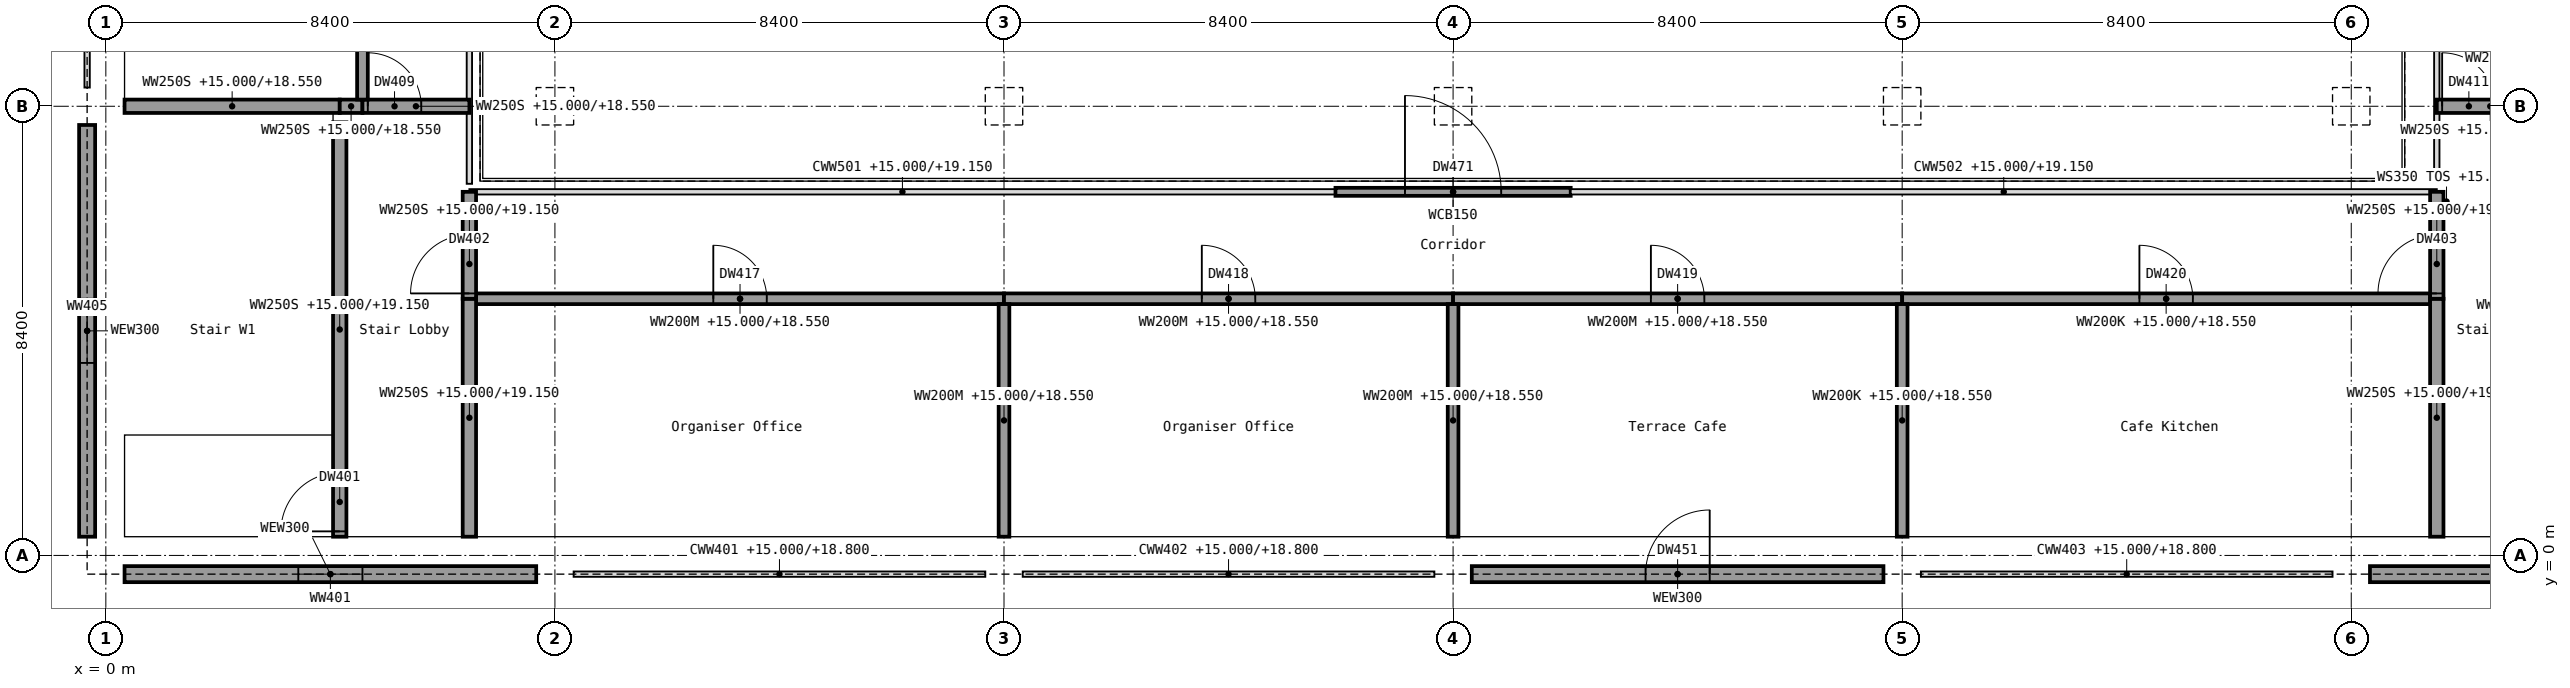
"""IFC4 building model, lengths in metres.
Left out: names, types, materials, properties, quantities, classifications, styles, units other than length and angle.
Written with IfcOpenShell. Run it as: python <this file> out.ifc"""

import sys

from ifc_helpers import new_model, si_unit, direction, frame, frame_2d, origin, origin_2d, place, context, subcontext, project, spatial, rectangle, extrude, element, fill, save


model = new_model("IFC4")
c1 = context("Model", 3, precision=1e-05, world=origin(), true_north=direction((0.0, 1.0)))
c2 = subcontext(c1, "Body", "Model", "MODEL_VIEW")
j1 = project(units=[si_unit("LENGTHUNIT", "METRE"), si_unit("PLANEANGLEUNIT", "RADIAN")], contexts=[c1])
p1 = place(None, origin())
s1 = spatial("IfcSite", under=j1, at=p1, CompositionType="ELEMENT")
p2 = place(p1, origin())
s2 = spatial("IfcBuilding", under=s1, at=p2, CompositionType="ELEMENT")
p3 = place(p2, frame((0.0, 0.0, 15.0)))
s3 = spatial("IfcBuildingStorey", under=s2, at=p3, CompositionType="ELEMENT", Elevation=15.0)
for number, where, z_axis, x_axis in (
    (1, (0.0, 0.0, 0.0), (0.0, 0.0, 1.0), (1.0, 0.0, 0.0)),
    (2, (0.0, 8.4, 0.0), (0.0, 0.0, 1.0), (1.0, 0.0, 0.0)),
    (3, (8.4, 0.0, 0.0), (0.0, 0.0, 1.0), (1.0, 0.0, 0.0)),
    (4, (8.4, 8.4, 0.0), (0.0, 0.0, 1.0), (1.0, 0.0, 0.0)),
    (5, (16.8, 0.0, 0.0), (0.0, 0.0, 1.0), (1.0, 0.0, 0.0)),
    (6, (16.8, 8.4, 0.0), (0.0, 0.0, 1.0), (1.0, 0.0, 0.0)),
    (7, (25.2, 0.0, 0.0), (0.0, 0.0, 1.0), (1.0, 0.0, 0.0)),
    (8, (25.2, 8.4, 0.0), (0.0, 0.0, 1.0), (1.0, 0.0, 0.0)),
    (9, (33.6, 0.0, 0.0), (0.0, 0.0, 1.0), (1.0, 0.0, 0.0)),
    (10, (33.6, 8.4, 0.0), (0.0, 0.0, 1.0), (1.0, 0.0, 0.0)),
    (11, (42.0, 0.0, 0.0), (0.0, 0.0, 1.0), (1.0, 0.0, 0.0)),
    (12, (42.0, 8.4, 0.0), (0.0, 0.0, 1.0), (1.0, 0.0, 0.0)),
):
    element("IfcColumn", number, at=place(p3, frame(where, z_axis=z_axis, x_axis=x_axis)), inside=s3, PredefinedType="COLUMN", context=c2, shape_type="SweptSolid", body=[
        extrude(rectangle(XDim=0.7, YDim=0.7, at=origin_2d()), origin(), (0.0, 0.0, 1.0), 4.5),
    ])
p4 = place(p3, frame((0.35, -0.35, 0.0), z_axis=(0.0, 0.0, 1.0), x_axis=(1.0, 0.0, 0.0)))
e13 = element("IfcWall", 13, at=p4, inside=s3, PredefinedType="SOLIDWALL", context=c2, shape_type="SweptSolid", body=[
    extrude(rectangle(XDim=7.7, YDim=0.3, at=frame_2d((3.85, 0.0))), origin(), (0.0, 0.0, 1.0), 3.8),
])
p5 = place(p4, frame((3.25, 0.0, 1.0)))
e14 = element("IfcOpeningElement", 14, at=p5, cuts=e13, PredefinedType="OPENING", context=c2, shape_type="SweptSolid", body=[
    extrude(rectangle(XDim=1.2, YDim=1.5, at=frame_2d((0.6, 0.75))), frame((0.0, 0.15, 0.0), z_axis=(0.0, -1.0, 0.0), x_axis=(1.0, 0.0, 0.0)), (0.0, 0.0, 1.0), 0.3),
])
p6 = place(p3, frame((25.55, -0.35, 0.0), z_axis=(0.0, 0.0, 1.0), x_axis=(1.0, 0.0, 0.0)))
e15 = element("IfcWall", 15, at=p6, inside=s3, PredefinedType="SOLIDWALL", context=c2, shape_type="SweptSolid", body=[
    extrude(rectangle(XDim=7.7, YDim=0.3, at=frame_2d((3.85, 0.0))), origin(), (0.0, 0.0, 1.0), 3.8),
])
p7 = place(p6, frame((3.25, 0.0, 0.0)))
e16 = element("IfcOpeningElement", 16, at=p7, cuts=e15, PredefinedType="OPENING", context=c2, shape_type="SweptSolid", body=[
    extrude(rectangle(XDim=1.2, YDim=2.1, at=frame_2d((0.6, 1.05))), frame((0.0, 0.15, 0.0), z_axis=(0.0, -1.0, 0.0), x_axis=(1.0, 0.0, 0.0)), (0.0, 0.0, 1.0), 0.3),
])
p8 = place(p3, frame((42.35, -0.35, 0.0), z_axis=(0.0, 0.0, 1.0), x_axis=(1.0, 0.0, 0.0)))
e17 = element("IfcWall", 17, at=p8, inside=s3, PredefinedType="SOLIDWALL", context=c2, shape_type="SweptSolid", body=[
    extrude(rectangle(XDim=7.7, YDim=0.3, at=frame_2d((3.85, 0.0))), origin(), (0.0, 0.0, 1.0), 3.8),
])
p9 = place(p8, frame((3.25, 0.0, 1.0)))
e18 = element("IfcOpeningElement", 18, at=p9, cuts=e17, PredefinedType="OPENING", context=c2, shape_type="SweptSolid", body=[
    extrude(rectangle(XDim=1.2, YDim=1.5, at=frame_2d((0.6, 0.75))), frame((0.0, 0.15, 0.0), z_axis=(0.0, -1.0, 0.0), x_axis=(1.0, 0.0, 0.0)), (0.0, 0.0, 1.0), 0.3),
])
p10 = place(p3, frame((-0.35, 0.35, 0.0), z_axis=(0.0, 0.0, 1.0), x_axis=(0.0, 1.0, 0.0)))
e19 = element("IfcWall", 19, at=p10, inside=s3, PredefinedType="SOLIDWALL", context=c2, shape_type="SweptSolid", body=[
    extrude(rectangle(XDim=7.7, YDim=0.3, at=frame_2d((3.85, 0.0))), origin(), (0.0, 0.0, 1.0), 3.8),
])
p11 = place(p10, frame((3.25, 0.0, 1.0)))
e20 = element("IfcOpeningElement", 20, at=p11, cuts=e19, PredefinedType="OPENING", context=c2, shape_type="SweptSolid", body=[
    extrude(rectangle(XDim=1.2, YDim=1.5, at=frame_2d((0.6, 0.75))), frame((0.0, 0.15, 0.0), z_axis=(0.0, -1.0, 0.0), x_axis=(1.0, 0.0, 0.0)), (0.0, 0.0, 1.0), 0.3),
])
p12 = place(p3, frame((23.0, 6.8, 0.0), z_axis=(0.0, 0.0, 1.0), x_axis=(1.0, 0.0, 0.0)))
e21 = element("IfcWall", 21, at=p12, inside=s3, PredefinedType="SOLIDWALL", context=c2, shape_type="SweptSolid", body=[
    extrude(rectangle(XDim=4.4, YDim=0.15, at=frame_2d((2.2, 0.0))), origin(), (0.0, 0.0, 1.0), 4.15),
])
p13 = place(p12, frame((1.3, 0.0, 0.0)))
e22 = element("IfcOpeningElement", 22, at=p13, cuts=e21, PredefinedType="OPENING", context=c2, shape_type="SweptSolid", body=[
    extrude(rectangle(XDim=1.8, YDim=2.4, at=frame_2d((0.9, 1.2))), frame((0.0, 0.075, 0.0), z_axis=(0.0, -1.0, 0.0), x_axis=(1.0, 0.0, 0.0)), (0.0, 0.0, 1.0), 0.15),
])
p14 = place(p3, frame((6.925, 4.8, 0.0), z_axis=(0.0, 0.0, 1.0), x_axis=(1.0, 0.0, 0.0)))
e23 = element("IfcWall", 23, at=p14, inside=s3, PredefinedType="PARTITIONING", context=c2, shape_type="SweptSolid", body=[
    extrude(rectangle(XDim=9.875, YDim=0.2, at=frame_2d((4.938, 0.0))), origin(), (0.0, 0.0, 1.0), 3.55),
])
p15 = place(p14, frame((4.438, 0.0, 0.0)))
e24 = element("IfcOpeningElement", 24, at=p15, cuts=e23, PredefinedType="OPENING", context=c2, shape_type="SweptSolid", body=[
    extrude(rectangle(XDim=1.0, YDim=2.1, at=frame_2d((0.5, 1.05))), frame((0.0, 0.1, 0.0), z_axis=(0.0, -1.0, 0.0), x_axis=(1.0, 0.0, 0.0)), (0.0, 0.0, 1.0), 0.2),
])
p16 = place(p3, frame((16.8, 4.8, 0.0), z_axis=(0.0, 0.0, 1.0), x_axis=(1.0, 0.0, 0.0)))
e25 = element("IfcWall", 25, at=p16, inside=s3, PredefinedType="PARTITIONING", context=c2, shape_type="SweptSolid", body=[
    extrude(rectangle(XDim=8.4, YDim=0.2, at=frame_2d((4.2, 0.0))), origin(), (0.0, 0.0, 1.0), 3.55),
])
p17 = place(p16, frame((3.7, 0.0, 0.0)))
e26 = element("IfcOpeningElement", 26, at=p17, cuts=e25, PredefinedType="OPENING", context=c2, shape_type="SweptSolid", body=[
    extrude(rectangle(XDim=1.0, YDim=2.1, at=frame_2d((0.5, 1.05))), frame((0.0, 0.1, 0.0), z_axis=(0.0, -1.0, 0.0), x_axis=(1.0, 0.0, 0.0)), (0.0, 0.0, 1.0), 0.2),
])
p18 = place(p3, frame((25.2, 4.8, 0.0), z_axis=(0.0, 0.0, 1.0), x_axis=(1.0, 0.0, 0.0)))
e27 = element("IfcWall", 27, at=p18, inside=s3, PredefinedType="PARTITIONING", context=c2, shape_type="SweptSolid", body=[
    extrude(rectangle(XDim=8.4, YDim=0.2, at=frame_2d((4.2, 0.0))), origin(), (0.0, 0.0, 1.0), 3.55),
])
p19 = place(p18, frame((3.7, 0.0, 0.0)))
e28 = element("IfcOpeningElement", 28, at=p19, cuts=e27, PredefinedType="OPENING", context=c2, shape_type="SweptSolid", body=[
    extrude(rectangle(XDim=1.0, YDim=2.1, at=frame_2d((0.5, 1.05))), frame((0.0, 0.1, 0.0), z_axis=(0.0, -1.0, 0.0), x_axis=(1.0, 0.0, 0.0)), (0.0, 0.0, 1.0), 0.2),
])
p20 = place(p3, frame((33.6, 4.8, 0.0), z_axis=(0.0, 0.0, 1.0), x_axis=(1.0, 0.0, 0.0)))
e29 = element("IfcWall", 29, at=p20, inside=s3, PredefinedType="SOLIDWALL", context=c2, shape_type="SweptSolid", body=[
    extrude(rectangle(XDim=9.875, YDim=0.2, at=frame_2d((4.938, 0.0))), origin(), (0.0, 0.0, 1.0), 3.55),
])
p21 = place(p20, frame((4.438, 0.0, 0.0)))
e30 = element("IfcOpeningElement", 30, at=p21, cuts=e29, PredefinedType="OPENING", context=c2, shape_type="SweptSolid", body=[
    extrude(rectangle(XDim=1.0, YDim=2.1, at=frame_2d((0.5, 1.05))), frame((0.0, 0.1, 0.0), z_axis=(0.0, -1.0, 0.0), x_axis=(1.0, 0.0, 0.0)), (0.0, 0.0, 1.0), 0.2),
])
p22 = place(p3, frame((0.35, 8.4, 0.0), z_axis=(0.0, 0.0, 1.0), x_axis=(1.0, 0.0, 0.0)))
e31 = element("IfcWall", 31, at=p22, inside=s3, PredefinedType="SHEAR", context=c2, shape_type="SweptSolid", body=[
    extrude(rectangle(XDim=4.025, YDim=0.25, at=frame_2d((2.012, 0.0))), origin(), (0.0, 0.0, 1.0), 3.55),
])
p23 = place(p3, frame((4.375, 8.4, 0.0), z_axis=(0.0, 0.0, 1.0), x_axis=(1.0, 0.0, 0.0)))
e32 = element("IfcWall", 32, at=p23, inside=s3, PredefinedType="SHEAR", context=c2, shape_type="SweptSolid", body=[
    extrude(rectangle(XDim=0.425, YDim=0.25, at=frame_2d((0.212, 0.0))), origin(), (0.0, 0.0, 1.0), 3.55),
])
p24 = place(p3, frame((4.8, 8.4, 0.0), z_axis=(0.0, 0.0, 1.0), x_axis=(1.0, 0.0, 0.0)))
e33 = element("IfcWall", 33, at=p24, inside=s3, PredefinedType="SHEAR", context=c2, shape_type="SweptSolid", body=[
    extrude(rectangle(XDim=2.0, YDim=0.25, at=frame_2d((1.0, 0.0))), origin(), (0.0, 0.0, 1.0), 3.55),
])
p25 = place(p24, frame((0.1, 0.0, 0.0)))
e34 = element("IfcOpeningElement", 34, at=p25, cuts=e33, PredefinedType="OPENING", context=c2, shape_type="SweptSolid", body=[
    extrude(rectangle(XDim=1.0, YDim=2.1, at=frame_2d((0.5, 1.05))), frame((0.0, 0.125, 0.0), z_axis=(0.0, -1.0, 0.0), x_axis=(1.0, 0.0, 0.0)), (0.0, 0.0, 1.0), 0.25),
])
p26 = place(p3, frame((43.6, 8.4, 0.0), z_axis=(0.0, 0.0, 1.0), x_axis=(1.0, 0.0, 0.0)))
e35 = element("IfcWall", 35, at=p26, inside=s3, PredefinedType="SHEAR", context=c2, shape_type="SweptSolid", body=[
    extrude(rectangle(XDim=2.0, YDim=0.25, at=frame_2d((1.0, 0.0))), origin(), (0.0, 0.0, 1.0), 3.55),
])
p27 = place(p26, frame((0.1, 0.0, 0.0)))
e36 = element("IfcOpeningElement", 36, at=p27, cuts=e35, PredefinedType="OPENING", context=c2, shape_type="SweptSolid", body=[
    extrude(rectangle(XDim=1.0, YDim=2.1, at=frame_2d((0.5, 1.05))), frame((0.0, 0.125, 0.0), z_axis=(0.0, -1.0, 0.0), x_axis=(1.0, 0.0, 0.0)), (0.0, 0.0, 1.0), 0.25),
])
p28 = place(p3, frame((4.375, 0.35, 0.0), z_axis=(0.0, 0.0, 1.0), x_axis=(0.0, 1.0, 0.0)))
e37 = element("IfcWall", 37, at=p28, inside=s3, PredefinedType="SHEAR", context=c2, shape_type="SweptSolid", body=[
    extrude(rectangle(XDim=7.75, YDim=0.25, at=frame_2d((3.875, 0.0))), origin(), (0.0, 0.0, 1.0), 4.15),
])
p29 = place(p28, frame((0.1, 0.0, 0.0)))
e38 = element("IfcOpeningElement", 38, at=p29, cuts=e37, PredefinedType="OPENING", context=c2, shape_type="SweptSolid", body=[
    extrude(rectangle(XDim=1.1, YDim=2.1, at=frame_2d((0.55, 1.05))), frame((0.0, 0.125, 0.0), z_axis=(0.0, -1.0, 0.0), x_axis=(1.0, 0.0, 0.0)), (0.0, 0.0, 1.0), 0.25),
])
p30 = place(p3, frame((4.8, 8.525, 0.0), z_axis=(0.0, 0.0, 1.0), x_axis=(0.0, 1.0, 0.0)))
e39 = element("IfcWall", 39, at=p30, inside=s3, PredefinedType="PARTITIONING", context=c2, shape_type="SweptSolid", body=[
    extrude(rectangle(XDim=8.275, YDim=0.2, at=frame_2d((4.138, 0.0))), origin(), (0.0, 0.0, 1.0), 3.55),
])
p31 = place(p30, frame((3.637, 0.0, 0.0)))
e40 = element("IfcOpeningElement", 40, at=p31, cuts=e39, PredefinedType="OPENING", context=c2, shape_type="SweptSolid", body=[
    extrude(rectangle(XDim=1.0, YDim=2.1, at=frame_2d((0.5, 1.05))), frame((0.0, 0.1, 0.0), z_axis=(0.0, -1.0, 0.0), x_axis=(1.0, 0.0, 0.0)), (0.0, 0.0, 1.0), 0.2),
])
p32 = place(p3, frame((6.8, 0.35, 0.0), z_axis=(0.0, 0.0, 1.0), x_axis=(0.0, 1.0, 0.0)))
e41 = element("IfcWall", 41, at=p32, inside=s3, PredefinedType="SHEAR", context=c2, shape_type="SweptSolid", body=[
    extrude(rectangle(XDim=4.45, YDim=0.25, at=frame_2d((2.225, 0.0))), origin(), (0.0, 0.0, 1.0), 4.15),
])
p33 = place(p3, frame((6.8, 4.8, 0.0), z_axis=(0.0, 0.0, 1.0), x_axis=(0.0, 1.0, 0.0)))
e42 = element("IfcWall", 42, at=p33, inside=s3, PredefinedType="SHEAR", context=c2, shape_type="SweptSolid", body=[
    extrude(rectangle(XDim=2.0, YDim=0.25, at=frame_2d((1.0, 0.0))), origin(), (0.0, 0.0, 1.0), 4.15),
])
p34 = place(p33, frame((0.1, 0.0, 0.0)))
e43 = element("IfcOpeningElement", 43, at=p34, cuts=e42, PredefinedType="OPENING", context=c2, shape_type="SweptSolid", body=[
    extrude(rectangle(XDim=1.1, YDim=2.1, at=frame_2d((0.55, 1.05))), frame((0.0, 0.125, 0.0), z_axis=(0.0, -1.0, 0.0), x_axis=(1.0, 0.0, 0.0)), (0.0, 0.0, 1.0), 0.25),
])
for number, where, z_axis, x_axis in (
    (44, (16.8, 0.35, 0.0), (0.0, 0.0, 1.0), (0.0, 1.0, 0.0)),
    (45, (25.2, 0.35, 0.0), (0.0, 0.0, 1.0), (0.0, 1.0, 0.0)),
):
    element("IfcWall", number, at=place(p3, frame(where, z_axis=z_axis, x_axis=x_axis)), inside=s3, PredefinedType="PARTITIONING", context=c2, shape_type="SweptSolid", body=[
        extrude(rectangle(XDim=4.35, YDim=0.2, at=frame_2d((2.175, 0.0))), origin(), (0.0, 0.0, 1.0), 3.55),
    ])
p35 = place(p3, frame((33.6, 0.35, 0.0), z_axis=(0.0, 0.0, 1.0), x_axis=(0.0, 1.0, 0.0)))
e46 = element("IfcWall", 46, at=p35, inside=s3, PredefinedType="SOLIDWALL", context=c2, shape_type="SweptSolid", body=[
    extrude(rectangle(XDim=4.35, YDim=0.2, at=frame_2d((2.175, 0.0))), origin(), (0.0, 0.0, 1.0), 3.55),
])
p36 = place(p3, frame((43.6, 0.35, 0.0), z_axis=(0.0, 0.0, 1.0), x_axis=(0.0, 1.0, 0.0)))
e47 = element("IfcWall", 47, at=p36, inside=s3, PredefinedType="SHEAR", context=c2, shape_type="SweptSolid", body=[
    extrude(rectangle(XDim=4.45, YDim=0.25, at=frame_2d((2.225, 0.0))), origin(), (0.0, 0.0, 1.0), 4.15),
])
p37 = place(p3, frame((43.6, 4.8, 0.0), z_axis=(0.0, 0.0, 1.0), x_axis=(0.0, 1.0, 0.0)))
e48 = element("IfcWall", 48, at=p37, inside=s3, PredefinedType="SHEAR", context=c2, shape_type="SweptSolid", body=[
    extrude(rectangle(XDim=2.0, YDim=0.25, at=frame_2d((1.0, 0.0))), origin(), (0.0, 0.0, 1.0), 4.15),
])
p38 = place(p37, frame((0.1, 0.0, 0.0)))
e49 = element("IfcOpeningElement", 49, at=p38, cuts=e48, PredefinedType="OPENING", context=c2, shape_type="SweptSolid", body=[
    extrude(rectangle(XDim=1.1, YDim=2.1, at=frame_2d((0.55, 1.05))), frame((0.0, 0.125, 0.0), z_axis=(0.0, -1.0, 0.0), x_axis=(1.0, 0.0, 0.0)), (0.0, 0.0, 1.0), 0.25),
])
p39 = place(p5, origin())
e50 = element("IfcWindow", 50, at=p39, inside=s3, PartitioningType="SINGLE_PANEL", PredefinedType="WINDOW", context=c2, shape_type="SweptSolid", body=[
    extrude(rectangle(XDim=1.2, YDim=1.5, at=frame_2d((0.6, 0.75))), frame((0.0, 0.03, 0.0), z_axis=(0.0, -1.0, 0.0), x_axis=(1.0, 0.0, 0.0)), (0.0, 0.0, 1.0), 0.06),
])
fill(e14, e50)
p40 = place(p7, origin())
e51 = element("IfcDoor", 51, at=p40, inside=s3, OperationType="SINGLE_SWING_RIGHT", PredefinedType="DOOR", context=c2, shape_type="SweptSolid", body=[
    extrude(rectangle(XDim=1.2, YDim=2.1, at=frame_2d((0.6, 1.05))), frame((0.0, 0.025, 0.0), z_axis=(0.0, -1.0, 0.0), x_axis=(1.0, 0.0, 0.0)), (0.0, 0.0, 1.0), 0.05),
])
fill(e16, e51)
p41 = place(p11, origin())
e52 = element("IfcWindow", 52, at=p41, inside=s3, PartitioningType="SINGLE_PANEL", PredefinedType="WINDOW", context=c2, shape_type="SweptSolid", body=[
    extrude(rectangle(XDim=1.2, YDim=1.5, at=frame_2d((0.6, 0.75))), frame((0.0, 0.03, 0.0), z_axis=(0.0, -1.0, 0.0), x_axis=(1.0, 0.0, 0.0)), (0.0, 0.0, 1.0), 0.06),
])
fill(e20, e52)
p42 = place(p13, origin())
e53 = element("IfcDoor", 53, at=p42, inside=s3, OperationType="DOUBLE_DOOR_DOUBLE_SWING", PredefinedType="DOOR", context=c2, shape_type="SweptSolid", body=[
    extrude(rectangle(XDim=1.8, YDim=2.4, at=frame_2d((0.9, 1.2))), frame((0.0, 0.025, 0.0), z_axis=(0.0, -1.0, 0.0), x_axis=(1.0, 0.0, 0.0)), (0.0, 0.0, 1.0), 0.05),
])
fill(e22, e53)
p43 = place(p29, origin())
e54 = element("IfcDoor", 54, at=p43, inside=s3, OperationType="SINGLE_SWING_LEFT", PredefinedType="DOOR", context=c2, shape_type="SweptSolid", body=[
    extrude(rectangle(XDim=1.1, YDim=2.1, at=frame_2d((0.55, 1.05))), frame((0.0, 0.025, 0.0), z_axis=(0.0, -1.0, 0.0), x_axis=(1.0, 0.0, 0.0)), (0.0, 0.0, 1.0), 0.05),
])
fill(e38, e54)
p44 = place(p34, origin())
e55 = element("IfcDoor", 55, at=p44, inside=s3, OperationType="SINGLE_SWING_LEFT", PredefinedType="DOOR", context=c2, shape_type="SweptSolid", body=[
    extrude(rectangle(XDim=1.1, YDim=2.1, at=frame_2d((0.55, 1.05))), frame((0.0, 0.025, 0.0), z_axis=(0.0, -1.0, 0.0), x_axis=(1.0, 0.0, 0.0)), (0.0, 0.0, 1.0), 0.05),
])
fill(e43, e55)
p45 = place(p38, origin())
e56 = element("IfcDoor", 56, at=p45, inside=s3, OperationType="SINGLE_SWING_LEFT", PredefinedType="DOOR", context=c2, shape_type="SweptSolid", body=[
    extrude(rectangle(XDim=1.1, YDim=2.1, at=frame_2d((0.55, 1.05))), frame((0.0, 0.025, 0.0), z_axis=(0.0, -1.0, 0.0), x_axis=(1.0, 0.0, 0.0)), (0.0, 0.0, 1.0), 0.05),
])
fill(e49, e56)
p46 = place(p25, origin())
e57 = element("IfcDoor", 57, at=p46, inside=s3, OperationType="SINGLE_SWING_LEFT", PredefinedType="DOOR", context=c2, shape_type="SweptSolid", body=[
    extrude(rectangle(XDim=1.0, YDim=2.1, at=frame_2d((0.5, 1.05))), frame((0.0, 0.025, 0.0), z_axis=(0.0, -1.0, 0.0), x_axis=(1.0, 0.0, 0.0)), (0.0, 0.0, 1.0), 0.05),
])
fill(e34, e57)
p47 = place(p27, origin())
e58 = element("IfcDoor", 58, at=p47, inside=s3, OperationType="SINGLE_SWING_LEFT", PredefinedType="DOOR", context=c2, shape_type="SweptSolid", body=[
    extrude(rectangle(XDim=1.0, YDim=2.1, at=frame_2d((0.5, 1.05))), frame((0.0, 0.025, 0.0), z_axis=(0.0, -1.0, 0.0), x_axis=(1.0, 0.0, 0.0)), (0.0, 0.0, 1.0), 0.05),
])
fill(e36, e58)
p48 = place(p15, origin())
e59 = element("IfcDoor", 59, at=p48, inside=s3, OperationType="SINGLE_SWING_LEFT", PredefinedType="DOOR", context=c2, shape_type="SweptSolid", body=[
    extrude(rectangle(XDim=1.0, YDim=2.1, at=frame_2d((0.5, 1.05))), frame((0.0, 0.025, 0.0), z_axis=(0.0, -1.0, 0.0), x_axis=(1.0, 0.0, 0.0)), (0.0, 0.0, 1.0), 0.05),
])
fill(e24, e59)
p49 = place(p17, origin())
e60 = element("IfcDoor", 60, at=p49, inside=s3, OperationType="SINGLE_SWING_LEFT", PredefinedType="DOOR", context=c2, shape_type="SweptSolid", body=[
    extrude(rectangle(XDim=1.0, YDim=2.1, at=frame_2d((0.5, 1.05))), frame((0.0, 0.025, 0.0), z_axis=(0.0, -1.0, 0.0), x_axis=(1.0, 0.0, 0.0)), (0.0, 0.0, 1.0), 0.05),
])
fill(e26, e60)
p50 = place(p19, origin())
e61 = element("IfcDoor", 61, at=p50, inside=s3, OperationType="SINGLE_SWING_LEFT", PredefinedType="DOOR", context=c2, shape_type="SweptSolid", body=[
    extrude(rectangle(XDim=1.0, YDim=2.1, at=frame_2d((0.5, 1.05))), frame((0.0, 0.025, 0.0), z_axis=(0.0, -1.0, 0.0), x_axis=(1.0, 0.0, 0.0)), (0.0, 0.0, 1.0), 0.05),
])
fill(e28, e61)
p51 = place(p21, origin())
e62 = element("IfcDoor", 62, at=p51, inside=s3, OperationType="SINGLE_SWING_LEFT", PredefinedType="DOOR", context=c2, shape_type="SweptSolid", body=[
    extrude(rectangle(XDim=1.0, YDim=2.1, at=frame_2d((0.5, 1.05))), frame((0.0, 0.025, 0.0), z_axis=(0.0, -1.0, 0.0), x_axis=(1.0, 0.0, 0.0)), (0.0, 0.0, 1.0), 0.05),
])
fill(e30, e62)
save(model, sys.argv[1])
